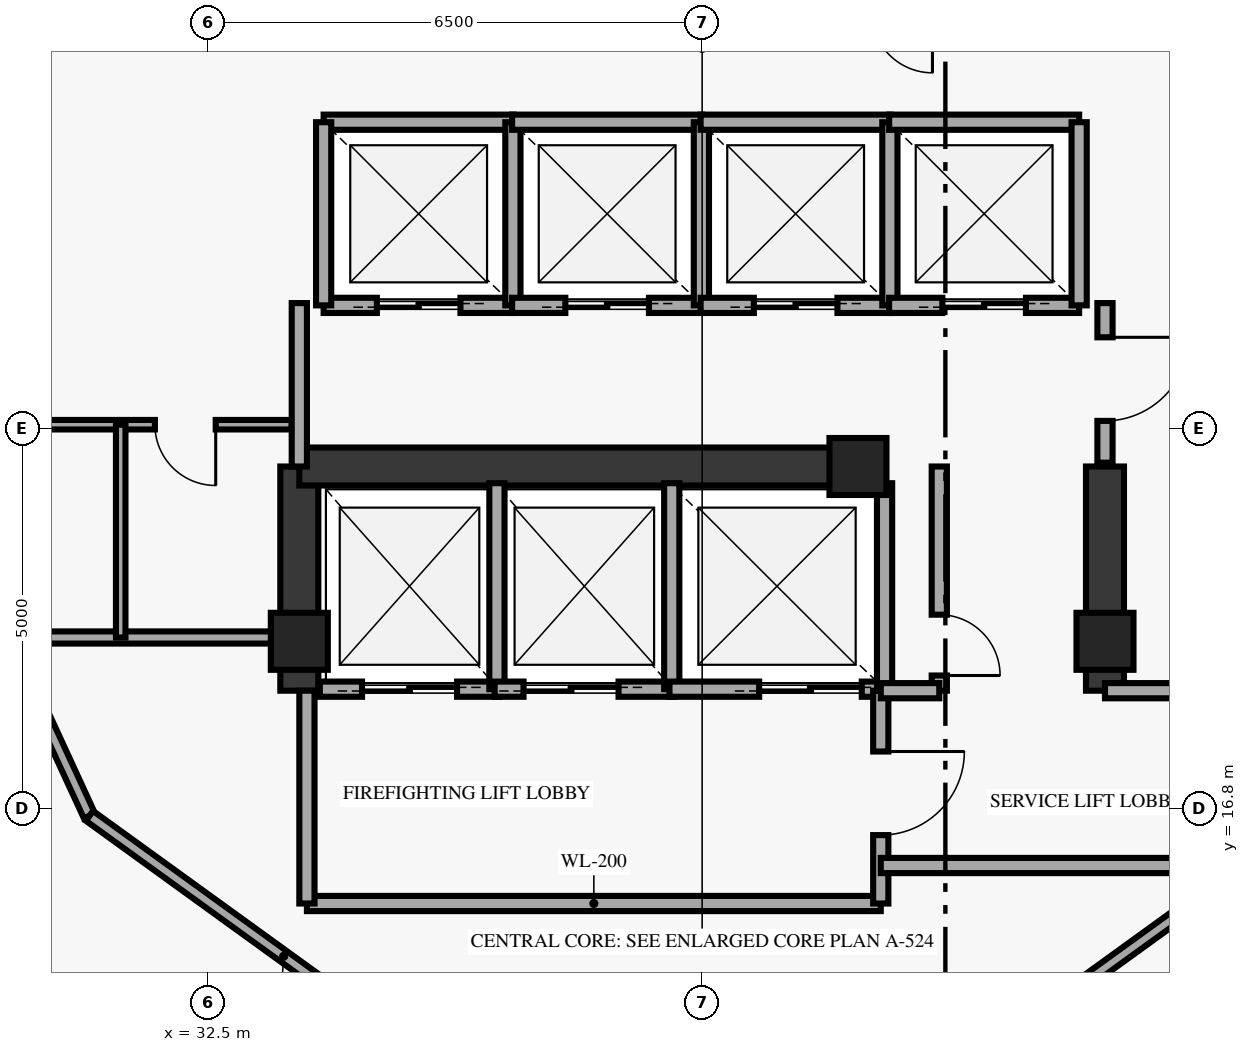
"""IFC4 building model, lengths in metres.
Left out: names, types, materials, properties, quantities, classifications, styles, units other than length and angle.
Written with IfcOpenShell. Run it as: python <this file> out.ifc"""

import sys

from ifc_helpers import new_model, si_unit, direction, frame, frame_2d, origin, origin_2d, place, context, subcontext, project, spatial, rectangle, extrude, element, fill, save


model = new_model("IFC4")
c1 = context("Model", 3, precision=1e-05, world=origin(), true_north=direction((0.0, 1.0)))
c2 = subcontext(c1, "Body", "Model", "MODEL_VIEW")
j1 = project(units=[si_unit("LENGTHUNIT", "METRE"), si_unit("PLANEANGLEUNIT", "RADIAN")], contexts=[c1])
p1 = place(None, origin())
s1 = spatial("IfcSite", under=j1, at=p1, CompositionType="ELEMENT")
p2 = place(p1, origin())
s2 = spatial("IfcBuilding", under=s1, at=p2, CompositionType="ELEMENT")
p3 = place(p2, frame((0.0, 0.0, 255.6)))
s3 = spatial("IfcBuildingStorey", under=s2, at=p3, CompositionType="ELEMENT", Elevation=255.6)
for number, where, z_axis, x_axis in (
    (1, (33.7, 19.0, 0.0), (0.0, 0.0, 1.0), (1.0, 0.0, 0.0)),
    (2, (41.05, 21.3, 0.0), (0.0, 0.0, 1.0), (1.0, 0.0, 0.0)),
    (3, (44.3, 19.0, 0.0), (0.0, 0.0, 1.0), (1.0, 0.0, 0.0)),
):
    element("IfcColumn", number, at=place(p3, frame(where, z_axis=z_axis, x_axis=x_axis)), inside=s3, PredefinedType="PILASTER", context=c2, shape_type="SweptSolid", body=[
        extrude(rectangle(XDim=0.75, YDim=0.75, at=origin_2d()), origin(), (0.0, 0.0, 1.0), 3.54),
    ])
for number, where, z_axis, x_axis in (
    (4, (33.7, 18.35, 0.0), (0.0, 0.0, 1.0), (0.0, 1.0, 0.0)),
    (5, (44.3, 18.35, 0.0), (0.0, 0.0, 1.0), (0.0, 1.0, 0.0)),
):
    element("IfcWall", number, at=place(p3, frame(where, z_axis=z_axis, x_axis=x_axis)), inside=s3, PredefinedType="SHEAR", context=c2, shape_type="SweptSolid", body=[
        extrude(rectangle(XDim=2.95, YDim=0.5, at=frame_2d((1.475, 0.0))), origin(), (0.0, 0.0, 1.0), 3.54),
    ])
p4 = place(p3, frame((33.7, 21.3, 0.0), z_axis=(0.0, 0.0, 1.0), x_axis=(1.0, 0.0, 0.0)))
e6 = element("IfcWall", 6, at=p4, inside=s3, PredefinedType="SHEAR", context=c2, shape_type="SweptSolid", body=[
    extrude(rectangle(XDim=7.55, YDim=0.5, at=frame_2d((3.775, 0.0))), origin(), (0.0, 0.0, 1.0), 3.54),
])
p5 = place(p3, frame((34.02, 23.42, 0.0), z_axis=(0.0, 0.0, 1.0), x_axis=(1.0, 0.0, 0.0)))
e7 = element("IfcWall", 7, at=p5, inside=s3, PredefinedType="SOLIDWALL", context=c2, shape_type="SweptSolid", body=[
    extrude(rectangle(XDim=2.5, YDim=0.2, at=frame_2d((1.25, 0.0))), origin(), (0.0, 0.0, 1.0), 3.54),
])
p6 = place(p5, frame((0.7, 0.0, 0.0)))
e8 = element("IfcOpeningElement", 8, at=p6, cuts=e7, PredefinedType="OPENING", context=c2, shape_type="SweptSolid", body=[
    extrude(rectangle(XDim=1.1, YDim=2.15, at=frame_2d((0.55, 1.075))), frame((0.0, 0.11, 0.0), z_axis=(0.0, -1.0, 0.0), x_axis=(1.0, 0.0, 0.0)), (0.0, 0.0, 1.0), 0.22),
])
p7 = place(p3, frame((34.02, 25.83, 0.0), z_axis=(0.0, 0.0, 1.0), x_axis=(1.0, 0.0, 0.0)))
e9 = element("IfcWall", 9, at=p7, inside=s3, PredefinedType="SOLIDWALL", context=c2, shape_type="SweptSolid", body=[
    extrude(rectangle(XDim=2.5, YDim=0.2, at=frame_2d((1.25, 0.0))), origin(), (0.0, 0.0, 1.0), 3.54),
])
for number, where, z_axis, x_axis in (
    (10, (34.02, 23.42, 0.0), (0.0, 0.0, 1.0), (0.0, 1.0, 0.0)),
    (11, (36.51, 23.42, 0.0), (0.0, 0.0, 1.0), (0.0, 1.0, 0.0)),
):
    element("IfcWall", number, at=place(p3, frame(where, z_axis=z_axis, x_axis=x_axis)), inside=s3, PredefinedType="SOLIDWALL", context=c2, shape_type="SweptSolid", body=[
        extrude(rectangle(XDim=2.41, YDim=0.2, at=frame_2d((1.205, 0.0))), origin(), (0.0, 0.0, 1.0), 3.54),
    ])
p8 = place(p3, frame((36.5, 23.42, 0.0), z_axis=(0.0, 0.0, 1.0), x_axis=(1.0, 0.0, 0.0)))
e12 = element("IfcWall", 12, at=p8, inside=s3, PredefinedType="SOLIDWALL", context=c2, shape_type="SweptSolid", body=[
    extrude(rectangle(XDim=2.5, YDim=0.2, at=frame_2d((1.25, 0.0))), origin(), (0.0, 0.0, 1.0), 3.54),
])
p9 = place(p8, frame((0.7, 0.0, 0.0)))
e13 = element("IfcOpeningElement", 13, at=p9, cuts=e12, PredefinedType="OPENING", context=c2, shape_type="SweptSolid", body=[
    extrude(rectangle(XDim=1.1, YDim=2.15, at=frame_2d((0.55, 1.075))), frame((0.0, 0.11, 0.0), z_axis=(0.0, -1.0, 0.0), x_axis=(1.0, 0.0, 0.0)), (0.0, 0.0, 1.0), 0.22),
])
p10 = place(p3, frame((36.5, 25.83, 0.0), z_axis=(0.0, 0.0, 1.0), x_axis=(1.0, 0.0, 0.0)))
e14 = element("IfcWall", 14, at=p10, inside=s3, PredefinedType="SOLIDWALL", context=c2, shape_type="SweptSolid", body=[
    extrude(rectangle(XDim=2.5, YDim=0.2, at=frame_2d((1.25, 0.0))), origin(), (0.0, 0.0, 1.0), 3.54),
])
p11 = place(p3, frame((38.99, 23.42, 0.0), z_axis=(0.0, 0.0, 1.0), x_axis=(0.0, 1.0, 0.0)))
e15 = element("IfcWall", 15, at=p11, inside=s3, PredefinedType="SOLIDWALL", context=c2, shape_type="SweptSolid", body=[
    extrude(rectangle(XDim=2.41, YDim=0.2, at=frame_2d((1.205, 0.0))), origin(), (0.0, 0.0, 1.0), 3.54),
])
p12 = place(p3, frame((38.98, 23.42, 0.0), z_axis=(0.0, 0.0, 1.0), x_axis=(1.0, 0.0, 0.0)))
e16 = element("IfcWall", 16, at=p12, inside=s3, PredefinedType="SOLIDWALL", context=c2, shape_type="SweptSolid", body=[
    extrude(rectangle(XDim=2.5, YDim=0.2, at=frame_2d((1.25, 0.0))), origin(), (0.0, 0.0, 1.0), 3.54),
])
p13 = place(p12, frame((0.7, 0.0, 0.0)))
e17 = element("IfcOpeningElement", 17, at=p13, cuts=e16, PredefinedType="OPENING", context=c2, shape_type="SweptSolid", body=[
    extrude(rectangle(XDim=1.1, YDim=2.15, at=frame_2d((0.55, 1.075))), frame((0.0, 0.11, 0.0), z_axis=(0.0, -1.0, 0.0), x_axis=(1.0, 0.0, 0.0)), (0.0, 0.0, 1.0), 0.22),
])
p14 = place(p3, frame((38.98, 25.83, 0.0), z_axis=(0.0, 0.0, 1.0), x_axis=(1.0, 0.0, 0.0)))
e18 = element("IfcWall", 18, at=p14, inside=s3, PredefinedType="SOLIDWALL", context=c2, shape_type="SweptSolid", body=[
    extrude(rectangle(XDim=2.5, YDim=0.2, at=frame_2d((1.25, 0.0))), origin(), (0.0, 0.0, 1.0), 3.54),
])
p15 = place(p3, frame((41.47, 23.42, 0.0), z_axis=(0.0, 0.0, 1.0), x_axis=(0.0, 1.0, 0.0)))
e19 = element("IfcWall", 19, at=p15, inside=s3, PredefinedType="SOLIDWALL", context=c2, shape_type="SweptSolid", body=[
    extrude(rectangle(XDim=2.41, YDim=0.2, at=frame_2d((1.205, 0.0))), origin(), (0.0, 0.0, 1.0), 3.54),
])
p16 = place(p3, frame((41.46, 23.42, 0.0), z_axis=(0.0, 0.0, 1.0), x_axis=(1.0, 0.0, 0.0)))
e20 = element("IfcWall", 20, at=p16, inside=s3, PredefinedType="SOLIDWALL", context=c2, shape_type="SweptSolid", body=[
    extrude(rectangle(XDim=2.5, YDim=0.2, at=frame_2d((1.25, 0.0))), origin(), (0.0, 0.0, 1.0), 3.54),
])
p17 = place(p16, frame((0.7, 0.0, 0.0)))
e21 = element("IfcOpeningElement", 21, at=p17, cuts=e20, PredefinedType="OPENING", context=c2, shape_type="SweptSolid", body=[
    extrude(rectangle(XDim=1.1, YDim=2.15, at=frame_2d((0.55, 1.075))), frame((0.0, 0.11, 0.0), z_axis=(0.0, -1.0, 0.0), x_axis=(1.0, 0.0, 0.0)), (0.0, 0.0, 1.0), 0.22),
])
p18 = place(p3, frame((41.46, 25.83, 0.0), z_axis=(0.0, 0.0, 1.0), x_axis=(1.0, 0.0, 0.0)))
e22 = element("IfcWall", 22, at=p18, inside=s3, PredefinedType="SOLIDWALL", context=c2, shape_type="SweptSolid", body=[
    extrude(rectangle(XDim=2.5, YDim=0.2, at=frame_2d((1.25, 0.0))), origin(), (0.0, 0.0, 1.0), 3.54),
])
p19 = place(p3, frame((43.96, 23.42, 0.0), z_axis=(0.0, 0.0, 1.0), x_axis=(0.0, 1.0, 0.0)))
e23 = element("IfcWall", 23, at=p19, inside=s3, PredefinedType="SOLIDWALL", context=c2, shape_type="SweptSolid", body=[
    extrude(rectangle(XDim=2.41, YDim=0.2, at=frame_2d((1.205, 0.0))), origin(), (0.0, 0.0, 1.0), 3.54),
])
p20 = place(p3, frame((33.97, 18.37, 0.0), z_axis=(0.0, 0.0, 1.0), x_axis=(1.0, 0.0, 0.0)))
e24 = element("IfcWall", 24, at=p20, inside=s3, PredefinedType="SOLIDWALL", context=c2, shape_type="SweptSolid", body=[
    extrude(rectangle(XDim=2.36, YDim=0.2, at=frame_2d((1.18, 0.0))), origin(), (0.0, 0.0, 1.0), 3.54),
])
p21 = place(p20, frame((0.555, 0.0, 0.0)))
e25 = element("IfcOpeningElement", 25, at=p21, cuts=e24, PredefinedType="OPENING", context=c2, shape_type="SweptSolid", body=[
    extrude(rectangle(XDim=1.25, YDim=2.2, at=frame_2d((0.625, 1.1))), frame((0.0, 0.11, 0.0), z_axis=(0.0, -1.0, 0.0), x_axis=(1.0, 0.0, 0.0)), (0.0, 0.0, 1.0), 0.22),
])
p22 = place(p3, frame((36.3, 18.37, 0.0), z_axis=(0.0, 0.0, 1.0), x_axis=(0.0, 1.0, 0.0)))
e26 = element("IfcWall", 26, at=p22, inside=s3, PredefinedType="SOLIDWALL", context=c2, shape_type="SweptSolid", body=[
    extrude(rectangle(XDim=2.71, YDim=0.2, at=frame_2d((1.355, 0.0))), origin(), (0.0, 0.0, 1.0), 3.54),
])
p23 = place(p3, frame((36.27, 18.37, 0.0), z_axis=(0.0, 0.0, 1.0), x_axis=(1.0, 0.0, 0.0)))
e27 = element("IfcWall", 27, at=p23, inside=s3, PredefinedType="SOLIDWALL", context=c2, shape_type="SweptSolid", body=[
    extrude(rectangle(XDim=2.36, YDim=0.2, at=frame_2d((1.18, 0.0))), origin(), (0.0, 0.0, 1.0), 3.54),
])
p24 = place(p23, frame((0.38, 0.0, 0.0)))
e28 = element("IfcOpeningElement", 28, at=p24, cuts=e27, PredefinedType="OPENING", context=c2, shape_type="SweptSolid", body=[
    extrude(rectangle(XDim=1.25, YDim=2.2, at=frame_2d((0.625, 1.1))), frame((0.0, 0.11, 0.0), z_axis=(0.0, -1.0, 0.0), x_axis=(1.0, 0.0, 0.0)), (0.0, 0.0, 1.0), 0.22),
])
p25 = place(p3, frame((38.6, 18.37, 0.0), z_axis=(0.0, 0.0, 1.0), x_axis=(0.0, 1.0, 0.0)))
e29 = element("IfcWall", 29, at=p25, inside=s3, PredefinedType="SOLIDWALL", context=c2, shape_type="SweptSolid", body=[
    extrude(rectangle(XDim=2.71, YDim=0.2, at=frame_2d((1.355, 0.0))), origin(), (0.0, 0.0, 1.0), 3.54),
])
p26 = place(p3, frame((38.57, 18.37, 0.0), z_axis=(0.0, 0.0, 1.0), x_axis=(1.0, 0.0, 0.0)))
e30 = element("IfcWall", 30, at=p26, inside=s3, PredefinedType="SOLIDWALL", context=c2, shape_type="SweptSolid", body=[
    extrude(rectangle(XDim=2.83, YDim=0.2, at=frame_2d((1.415, 0.0))), origin(), (0.0, 0.0, 1.0), 3.54),
])
p27 = place(p26, frame((1.18, 0.0, 0.0)))
e31 = element("IfcOpeningElement", 31, at=p27, cuts=e30, PredefinedType="OPENING", context=c2, shape_type="SweptSolid", body=[
    extrude(rectangle(XDim=1.35, YDim=2.18, at=frame_2d((0.675, 1.09))), frame((0.0, 0.11, 0.0), z_axis=(0.0, -1.0, 0.0), x_axis=(1.0, 0.0, 0.0)), (0.0, 0.0, 1.0), 0.22),
])
p28 = place(p3, frame((41.4, 18.37, 0.0), z_axis=(0.0, 0.0, 1.0), x_axis=(0.0, 1.0, 0.0)))
e32 = element("IfcWall", 32, at=p28, inside=s3, PredefinedType="SOLIDWALL", context=c2, shape_type="SweptSolid", body=[
    extrude(rectangle(XDim=2.71, YDim=0.2, at=frame_2d((1.355, 0.0))), origin(), (0.0, 0.0, 1.0), 3.54),
])
p29 = place(p3, frame((29.05, 19.05, 0.0), z_axis=(0.0, 0.0, 1.0), x_axis=(1.0, 0.0, 0.0)))
e33 = element("IfcWall", 33, at=p29, inside=s3, PredefinedType="PARTITIONING", context=c2, shape_type="SweptSolid", body=[
    extrude(rectangle(XDim=4.65, YDim=0.16, at=frame_2d((2.325, 0.0))), origin(), (0.0, 0.0, 1.0), 3.54),
])
p30 = place(p3, frame((33.6, 21.85, 0.0), z_axis=(0.0, 0.0, 1.0), x_axis=(-1.0, 0.0, 0.0)))
e34 = element("IfcWall", 34, at=p30, inside=s3, PredefinedType="PARTITIONING", context=c2, shape_type="SweptSolid", body=[
    extrude(rectangle(XDim=4.55, YDim=0.125, at=frame_2d((2.275, 0.0))), origin(), (0.0, 0.0, 1.0), 3.54),
])
p31 = place(p30, frame((3.2, 0.0, 0.0)))
e35 = element("IfcOpeningElement", 35, at=p31, cuts=e34, PredefinedType="OPENING", context=c2, shape_type="SweptSolid", body=[
    extrude(rectangle(XDim=0.8, YDim=2.05, at=frame_2d((0.4, 1.025))), frame((0.0, 0.073, 0.0), z_axis=(0.0, -1.0, 0.0), x_axis=(1.0, 0.0, 0.0)), (0.0, 0.0, 1.0), 0.145),
])
p32 = place(p30, frame((1.0, 0.0, 0.0)))
e36 = element("IfcOpeningElement", 36, at=p32, cuts=e34, PredefinedType="OPENING", context=c2, shape_type="SweptSolid", body=[
    extrude(rectangle(XDim=0.8, YDim=2.05, at=frame_2d((0.4, 1.025))), frame((0.0, 0.073, 0.0), z_axis=(0.0, -1.0, 0.0), x_axis=(1.0, 0.0, 0.0)), (0.0, 0.0, 1.0), 0.145),
])
p33 = place(p3, frame((31.35, 19.05, 0.0), z_axis=(0.0, 0.0, 1.0), x_axis=(0.0, 1.0, 0.0)))
e37 = element("IfcWall", 37, at=p33, inside=s3, PredefinedType="PARTITIONING", context=c2, shape_type="SweptSolid", body=[
    extrude(rectangle(XDim=2.8, YDim=0.125, at=frame_2d((1.4, 0.0))), origin(), (0.0, 0.0, 1.0), 3.54),
])
p34 = place(p3, frame((33.7, 21.3, 0.0), z_axis=(0.0, 0.0, 1.0), x_axis=(0.0, 1.0, 0.0)))
e38 = element("IfcWall", 38, at=p34, inside=s3, PredefinedType="SOLIDWALL", context=c2, shape_type="SweptSolid", body=[
    extrude(rectangle(XDim=2.15, YDim=0.2, at=frame_2d((1.075, 0.0))), origin(), (0.0, 0.0, 1.0), 2.925),
])
p35 = place(p3, frame((44.3, 21.35, 0.0), z_axis=(0.0, 0.0, 1.0), x_axis=(0.0, 1.0, 0.0)))
e39 = element("IfcWall", 39, at=p35, inside=s3, PredefinedType="SOLIDWALL", context=c2, shape_type="SweptSolid", body=[
    extrude(rectangle(XDim=2.1, YDim=0.2, at=frame_2d((1.05, 0.0))), origin(), (0.0, 0.0, 1.0), 2.925),
])
p36 = place(p35, frame((0.55, 0.0, 0.0)))
e40 = element("IfcOpeningElement", 40, at=p36, cuts=e39, PredefinedType="OPENING", context=c2, shape_type="SweptSolid", body=[
    extrude(rectangle(XDim=1.1, YDim=2.15, at=frame_2d((0.55, 1.075))), frame((0.0, 0.11, 0.0), z_axis=(0.0, -1.0, 0.0), x_axis=(1.0, 0.0, 0.0)), (0.0, 0.0, 1.0), 0.22),
])
p37 = place(p3, frame((33.8, 15.55, 0.0), z_axis=(0.0, 0.0, 1.0), x_axis=(1.0, 0.0, 0.0)))
e41 = element("IfcWall", 41, at=p37, inside=s3, PredefinedType="SOLIDWALL", context=c2, shape_type="SweptSolid", body=[
    extrude(rectangle(XDim=7.55, YDim=0.2, at=frame_2d((3.775, 0.0))), origin(), (0.0, 0.0, 1.0), 3.54),
])
p38 = place(p3, frame((33.8, 15.55, 0.0), z_axis=(0.0, 0.0, 1.0), x_axis=(0.0, 1.0, 0.0)))
e42 = element("IfcWall", 42, at=p38, inside=s3, PredefinedType="SOLIDWALL", context=c2, shape_type="SweptSolid", body=[
    extrude(rectangle(XDim=2.8, YDim=0.2, at=frame_2d((1.4, 0.0))), origin(), (0.0, 0.0, 1.0), 3.54),
])
p39 = place(p3, frame((41.35, 15.55, 0.0), z_axis=(0.0, 0.0, 1.0), x_axis=(0.0, 1.0, 0.0)))
e43 = element("IfcWall", 43, at=p39, inside=s3, PredefinedType="SOLIDWALL", context=c2, shape_type="SweptSolid", body=[
    extrude(rectangle(XDim=2.8, YDim=0.2, at=frame_2d((1.4, 0.0))), origin(), (0.0, 0.0, 1.0), 3.54),
])
p40 = place(p39, frame((0.9, 0.0, 0.0)))
e44 = element("IfcOpeningElement", 44, at=p40, cuts=e43, PredefinedType="OPENING", context=c2, shape_type="SweptSolid", body=[
    extrude(rectangle(XDim=1.1, YDim=2.15, at=frame_2d((0.55, 1.075))), frame((0.0, 0.11, 0.0), z_axis=(0.0, -1.0, 0.0), x_axis=(1.0, 0.0, 0.0)), (0.0, 0.0, 1.0), 0.22),
])
p41 = place(p3, frame((41.35, 16.05, 0.0), z_axis=(0.0, 0.0, 1.0), x_axis=(1.0, 0.0, 0.0)))
e45 = element("IfcWall", 45, at=p41, inside=s3, PredefinedType="SOLIDWALL", context=c2, shape_type="SweptSolid", body=[
    extrude(rectangle(XDim=4.5, YDim=0.2, at=frame_2d((2.25, 0.0))), origin(), (0.0, 0.0, 1.0), 3.54),
])
p42 = place(p3, frame((44.3, 18.35, 0.0), z_axis=(0.0, 0.0, 1.0), x_axis=(1.0, 0.0, 0.0)))
e46 = element("IfcWall", 46, at=p42, inside=s3, PredefinedType="SOLIDWALL", context=c2, shape_type="SweptSolid", body=[
    extrude(rectangle(XDim=1.55, YDim=0.2, at=frame_2d((0.775, 0.0))), origin(), (0.0, 0.0, 1.0), 3.54),
])
p43 = place(p3, frame((42.12, 18.35, 0.0), z_axis=(0.0, 0.0, 1.0), x_axis=(0.0, 1.0, 0.0)))
e47 = element("IfcWall", 47, at=p43, inside=s3, PredefinedType="SOLIDWALL", context=c2, shape_type="SweptSolid", body=[
    extrude(rectangle(XDim=2.95, YDim=0.2, at=frame_2d((1.475, 0.0))), origin(), (0.0, 0.0, 1.0), 3.54),
])
p44 = place(p43, frame((0.2, 0.0, 0.0)))
e48 = element("IfcOpeningElement", 48, at=p44, cuts=e47, PredefinedType="OPENING", context=c2, shape_type="SweptSolid", body=[
    extrude(rectangle(XDim=0.8, YDim=2.05, at=frame_2d((0.4, 1.025))), frame((0.0, 0.11, 0.0), z_axis=(0.0, -1.0, 0.0), x_axis=(1.0, 0.0, 0.0)), (0.0, 0.0, 1.0), 0.22),
])
p45 = place(p3, frame((41.35, 18.35, 0.0), z_axis=(0.0, 0.0, 1.0), x_axis=(1.0, 0.0, 0.0)))
e49 = element("IfcWall", 49, at=p45, inside=s3, PredefinedType="SOLIDWALL", context=c2, shape_type="SweptSolid", body=[
    extrude(rectangle(XDim=0.77, YDim=0.2, at=frame_2d((0.385, 0.0))), origin(), (0.0, 0.0, 1.0), 3.54),
])
p46 = place(p3, frame((27.988, 23.104, 0.0), z_axis=(0.0, 0.0, 1.0), x_axis=(0.418656179426, -0.908144814128, 0.0)))
e50 = element("IfcWall", 50, at=p46, inside=s3, PredefinedType="PARTITIONING", context=c2, shape_type="SweptSolid", body=[
    extrude(rectangle(XDim=7.049, YDim=0.16, at=frame_2d((3.524, 0.0))), origin(), (0.0, 0.0, 1.0), 3.54),
])
for number, where, z_axis, x_axis in (
    (51, (30.939, 16.703, 0.0), (0.0, 0.0, 1.0), (0.81, -0.586, 0.0)),
    (52, (41.951, 13.007, 0.0), (0.0, 0.0, 1.0), (0.81, 0.586, 0.0)),
):
    element("IfcWall", number, at=place(p3, frame(where, z_axis=z_axis, x_axis=x_axis)), inside=s3, PredefinedType="PARTITIONING", context=c2, shape_type="SweptSolid", body=[
        extrude(rectangle(XDim=6.306, YDim=0.16, at=frame_2d((3.153, 0.0))), origin(), (0.0, 0.0, 1.0), 3.54),
    ])
p47 = place(p3, frame((29.009, 15.599, 0.0), z_axis=(0.0, 0.0, 1.0), x_axis=(0.758094504626, -0.652144709444, 0.0)))
e53 = element("IfcWall", 53, at=p47, inside=s3, PredefinedType="PARTITIONING", context=c2, shape_type="SweptSolid", body=[
    extrude(rectangle(XDim=3.86, YDim=0.125, at=frame_2d((1.93, 0.0))), origin(), (0.0, 0.0, 1.0), 3.54),
])
p48 = place(p6, origin())
e54 = element("IfcDoor", 54, at=p48, inside=s3, OperationType="DOUBLE_DOOR_SLIDING", PredefinedType="DOOR", context=c2, shape_type="SweptSolid", body=[
    extrude(rectangle(XDim=1.1, YDim=2.15, at=frame_2d((0.55, 1.075))), frame((0.0, 0.025, 0.0), z_axis=(0.0, -1.0, 0.0), x_axis=(1.0, 0.0, 0.0)), (0.0, 0.0, 1.0), 0.05),
])
fill(e8, e54)
p49 = place(p9, origin())
e55 = element("IfcDoor", 55, at=p49, inside=s3, OperationType="DOUBLE_DOOR_SLIDING", PredefinedType="DOOR", context=c2, shape_type="SweptSolid", body=[
    extrude(rectangle(XDim=1.1, YDim=2.15, at=frame_2d((0.55, 1.075))), frame((0.0, 0.025, 0.0), z_axis=(0.0, -1.0, 0.0), x_axis=(1.0, 0.0, 0.0)), (0.0, 0.0, 1.0), 0.05),
])
fill(e13, e55)
p50 = place(p13, origin())
e56 = element("IfcDoor", 56, at=p50, inside=s3, OperationType="DOUBLE_DOOR_SLIDING", PredefinedType="DOOR", context=c2, shape_type="SweptSolid", body=[
    extrude(rectangle(XDim=1.1, YDim=2.15, at=frame_2d((0.55, 1.075))), frame((0.0, 0.025, 0.0), z_axis=(0.0, -1.0, 0.0), x_axis=(1.0, 0.0, 0.0)), (0.0, 0.0, 1.0), 0.05),
])
fill(e17, e56)
p51 = place(p17, origin())
e57 = element("IfcDoor", 57, at=p51, inside=s3, OperationType="DOUBLE_DOOR_SLIDING", PredefinedType="DOOR", context=c2, shape_type="SweptSolid", body=[
    extrude(rectangle(XDim=1.1, YDim=2.15, at=frame_2d((0.55, 1.075))), frame((0.0, 0.025, 0.0), z_axis=(0.0, -1.0, 0.0), x_axis=(1.0, 0.0, 0.0)), (0.0, 0.0, 1.0), 0.05),
])
fill(e21, e57)
p52 = place(p21, origin())
e58 = element("IfcDoor", 58, at=p52, inside=s3, OperationType="DOUBLE_DOOR_SLIDING", PredefinedType="DOOR", context=c2, shape_type="SweptSolid", body=[
    extrude(rectangle(XDim=1.25, YDim=2.2, at=frame_2d((0.625, 1.1))), frame((0.0, 0.025, 0.0), z_axis=(0.0, -1.0, 0.0), x_axis=(1.0, 0.0, 0.0)), (0.0, 0.0, 1.0), 0.05),
])
fill(e25, e58)
p53 = place(p24, origin())
e59 = element("IfcDoor", 59, at=p53, inside=s3, OperationType="DOUBLE_DOOR_SLIDING", PredefinedType="DOOR", context=c2, shape_type="SweptSolid", body=[
    extrude(rectangle(XDim=1.25, YDim=2.2, at=frame_2d((0.625, 1.1))), frame((0.0, 0.025, 0.0), z_axis=(0.0, -1.0, 0.0), x_axis=(1.0, 0.0, 0.0)), (0.0, 0.0, 1.0), 0.05),
])
fill(e28, e59)
p54 = place(p27, origin())
e60 = element("IfcDoor", 60, at=p54, inside=s3, OperationType="DOUBLE_DOOR_SLIDING", PredefinedType="DOOR", context=c2, shape_type="SweptSolid", body=[
    extrude(rectangle(XDim=1.35, YDim=2.18, at=frame_2d((0.675, 1.09))), frame((0.0, 0.025, 0.0), z_axis=(0.0, -1.0, 0.0), x_axis=(1.0, 0.0, 0.0)), (0.0, 0.0, 1.0), 0.05),
])
fill(e31, e60)
p55 = place(p32, origin())
e61 = element("IfcDoor", 61, at=p55, inside=s3, OperationType="SINGLE_SWING_LEFT", PredefinedType="DOOR", context=c2, shape_type="SweptSolid", body=[
    extrude(rectangle(XDim=0.8, YDim=2.05, at=frame_2d((0.4, 1.025))), frame((0.0, 0.025, 0.0), z_axis=(0.0, -1.0, 0.0), x_axis=(1.0, 0.0, 0.0)), (0.0, 0.0, 1.0), 0.05),
])
fill(e36, e61)
p56 = place(p36, origin())
e62 = element("IfcDoor", 62, at=p56, inside=s3, OperationType="SINGLE_SWING_RIGHT", PredefinedType="DOOR", context=c2, shape_type="SweptSolid", body=[
    extrude(rectangle(XDim=1.1, YDim=2.15, at=frame_2d((0.55, 1.075))), frame((0.0, 0.025, 0.0), z_axis=(0.0, -1.0, 0.0), x_axis=(1.0, 0.0, 0.0)), (0.0, 0.0, 1.0), 0.05),
])
fill(e40, e62)
p57 = place(p40, origin())
e63 = element("IfcDoor", 63, at=p57, inside=s3, OperationType="SINGLE_SWING_RIGHT", PredefinedType="DOOR", context=c2, shape_type="SweptSolid", body=[
    extrude(rectangle(XDim=1.1, YDim=2.15, at=frame_2d((0.55, 1.075))), frame((0.0, 0.025, 0.0), z_axis=(0.0, -1.0, 0.0), x_axis=(1.0, 0.0, 0.0)), (0.0, 0.0, 1.0), 0.05),
])
fill(e44, e63)
p58 = place(p44, origin())
e64 = element("IfcDoor", 64, at=p58, inside=s3, OperationType="SINGLE_SWING_LEFT", PredefinedType="DOOR", context=c2, shape_type="SweptSolid", body=[
    extrude(rectangle(XDim=0.8, YDim=2.05, at=frame_2d((0.4, 1.025))), frame((0.0, 0.025, 0.0), z_axis=(0.0, -1.0, 0.0), x_axis=(1.0, 0.0, 0.0)), (0.0, 0.0, 1.0), 0.05),
])
fill(e48, e64)
save(model, sys.argv[1])
